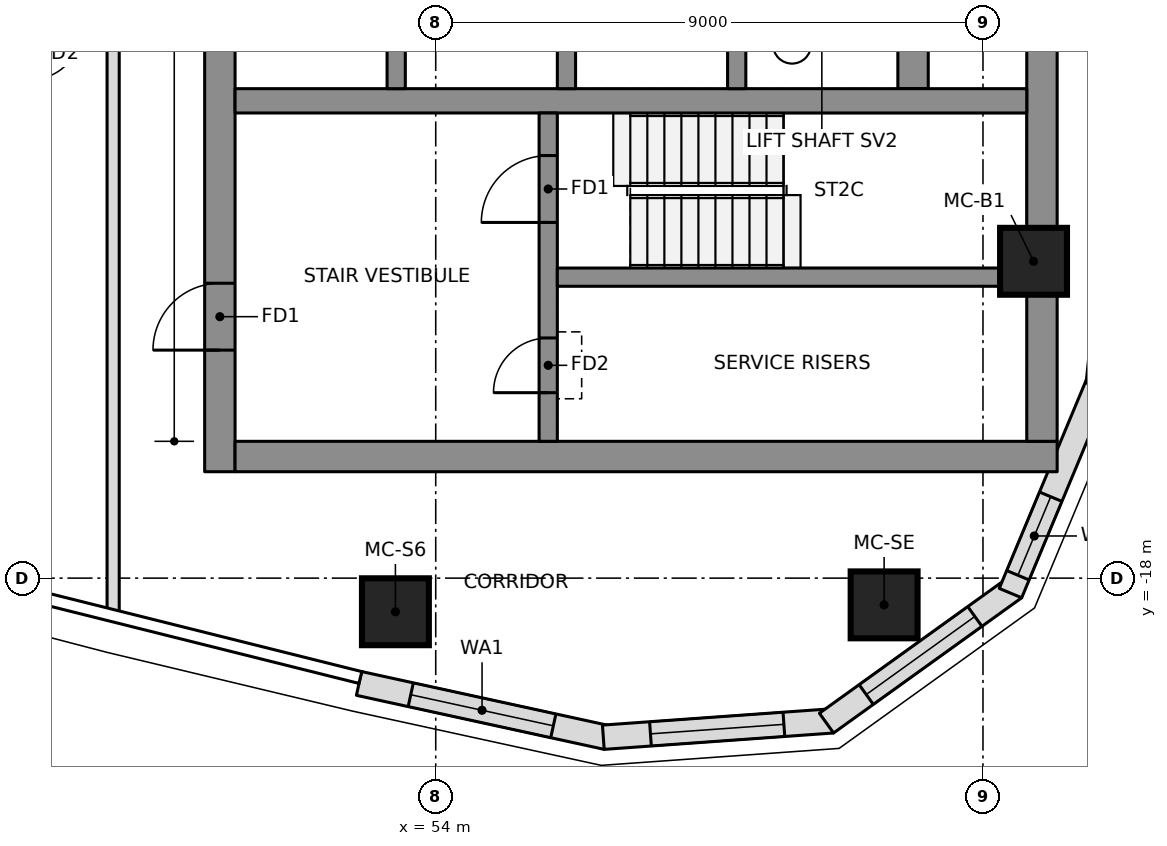
"""IFC4 building model, lengths in metres.
Left out: names, types, materials, properties, quantities, classifications, styles, units other than length and angle.
Written with IfcOpenShell. Run it as: python <this file> out.ifc"""

import sys

from ifc_helpers import new_model, si_unit, direction, frame, frame_2d, origin, origin_2d, place, context, subcontext, project, spatial, polyline, rectangle, outline, extrude, element, fill, save


model = new_model("IFC4")
c1 = context("Model", 3, precision=1e-05, world=origin(), true_north=direction((0.0, 1.0)))
c2 = subcontext(c1, "Body", "Model", "MODEL_VIEW")
j1 = project(units=[si_unit("LENGTHUNIT", "METRE"), si_unit("PLANEANGLEUNIT", "RADIAN")], contexts=[c1])
p1 = place(None, origin())
s1 = spatial("IfcSite", under=j1, at=p1, CompositionType="ELEMENT")
p2 = place(p1, origin())
s2 = spatial("IfcBuilding", under=s1, at=p2, CompositionType="ELEMENT")
p3 = place(p2, frame((0.0, 0.0, 292.75)))
s3 = spatial("IfcBuildingStorey", under=s2, at=p3, CompositionType="ELEMENT", Elevation=292.75)
p4 = place(p3, frame((50.45, -16.25, 0.0), z_axis=(0.0, 0.0, 1.0), x_axis=(0.0, 1.0, 0.0)))
e1 = element("IfcWall", 1, at=p4, inside=s3, PredefinedType="SHEAR", context=c2, shape_type="SweptSolid", body=[
    extrude(rectangle(XDim=9.6, YDim=0.5, at=frame_2d((4.8, 0.0))), origin(), (0.0, 0.0, 1.0), 3.55),
])
p5 = place(p4, frame((2.0, 0.0, 0.0)))
e2 = element("IfcOpeningElement", 2, at=p5, cuts=e1, PredefinedType="OPENING", context=c2, shape_type="SweptSolid", body=[
    extrude(rectangle(XDim=1.1, YDim=2.1, at=frame_2d((0.55, 1.05))), frame((0.0, 0.26, 0.0), z_axis=(0.0, -1.0, 0.0), x_axis=(1.0, 0.0, 0.0)), (0.0, 0.0, 1.0), 0.52),
])
p6 = place(p3, frame((50.7, -16.0, 0.0), z_axis=(0.0, 0.0, 1.0), x_axis=(1.0, 0.0, 0.0)))
e3 = element("IfcWall", 3, at=p6, inside=s3, PredefinedType="SHEAR", context=c2, shape_type="SweptSolid", body=[
    extrude(rectangle(XDim=13.52, YDim=0.5, at=frame_2d((6.76, 0.0))), origin(), (0.0, 0.0, 1.0), 3.55),
])
p7 = place(p3, frame((63.97, -15.75, 0.0), z_axis=(0.0, 0.0, 1.0), x_axis=(0.0, 1.0, 0.0)))
e4 = element("IfcWall", 4, at=p7, inside=s3, PredefinedType="SHEAR", context=c2, shape_type="SweptSolid", body=[
    extrude(rectangle(XDim=8.847, YDim=0.5, at=frame_2d((4.423, 0.0))), origin(), (0.0, 0.0, 1.0), 3.55),
])
p8 = place(p3, frame((61.85, -9.95, 0.0), z_axis=(0.0, 0.0, 1.0), x_axis=(0.0, 1.0, 0.0)))
e5 = element("IfcWall", 5, at=p8, inside=s3, PredefinedType="SHEAR", context=c2, shape_type="SweptSolid", body=[
    extrude(rectangle(XDim=19.9, YDim=0.5, at=frame_2d((9.95, 0.0))), origin(), (0.0, 0.0, 1.0), 3.55),
])
p9 = place(p3, frame((50.7, -10.15, 0.0), z_axis=(0.0, 0.0, 1.0), x_axis=(1.0, 0.0, 0.0)))
e6 = element("IfcWall", 6, at=p9, inside=s3, PredefinedType="SHEAR", context=c2, shape_type="SweptSolid", body=[
    extrude(rectangle(XDim=13.02, YDim=0.4, at=frame_2d((6.51, 0.0))), origin(), (0.0, 0.0, 1.0), 3.55),
])
for number, where, z_axis, x_axis in (
    (7, (53.35, -9.95, 0.0), (0.0, 0.0, 1.0), (0.0, 1.0, 0.0)),
    (8, (56.15, -9.95, 0.0), (0.0, 0.0, 1.0), (0.0, 1.0, 0.0)),
    (9, (58.95, -9.95, 0.0), (0.0, 0.0, 1.0), (0.0, 1.0, 0.0)),
):
    element("IfcWall", number, at=place(p3, frame(where, z_axis=z_axis, x_axis=x_axis)), inside=s3, PredefinedType="SHEAR", context=c2, shape_type="SweptSolid", body=[
        extrude(rectangle(XDim=3.0, YDim=0.3, at=frame_2d((1.5, 0.0))), origin(), (0.0, 0.0, 1.0), 3.55),
    ])
p10 = place(p3, frame((55.85, -15.75, 0.0), z_axis=(0.0, 0.0, 1.0), x_axis=(0.0, 1.0, 0.0)))
e10 = element("IfcWall", 10, at=p10, inside=s3, PredefinedType="SHEAR", context=c2, shape_type="SweptSolid", body=[
    extrude(rectangle(XDim=5.4, YDim=0.3, at=frame_2d((2.7, 0.0))), origin(), (0.0, 0.0, 1.0), 3.55),
])
p11 = place(p10, frame((3.6, 0.0, 0.0)))
e11 = element("IfcOpeningElement", 11, at=p11, cuts=e10, PredefinedType="OPENING", context=c2, shape_type="SweptSolid", body=[
    extrude(rectangle(XDim=1.1, YDim=2.1, at=frame_2d((0.55, 1.05))), frame((0.0, 0.16, 0.0), z_axis=(0.0, -1.0, 0.0), x_axis=(1.0, 0.0, 0.0)), (0.0, 0.0, 1.0), 0.32),
])
p12 = place(p10, frame((0.8, 0.0, 0.0)))
e12 = element("IfcOpeningElement", 12, at=p12, cuts=e10, PredefinedType="OPENING", context=c2, shape_type="SweptSolid", body=[
    extrude(rectangle(XDim=0.9, YDim=2.1, at=frame_2d((0.45, 1.05))), frame((0.0, 0.16, 0.0), z_axis=(0.0, -1.0, 0.0), x_axis=(1.0, 0.0, 0.0)), (0.0, 0.0, 1.0), 0.32),
])
p13 = place(p3, frame((56.0, -13.05, 0.0), z_axis=(0.0, 0.0, 1.0), x_axis=(1.0, 0.0, 0.0)))
e13 = element("IfcWall", 13, at=p13, inside=s3, PredefinedType="SHEAR", context=c2, shape_type="SweptSolid", body=[
    extrude(rectangle(XDim=7.72, YDim=0.3, at=frame_2d((3.86, 0.0))), origin(), (0.0, 0.0, 1.0), 3.55),
])
for number, where, z_axis, x_axis in (
    (14, (53.337, -18.553, 0.0), (0.0, 0.0, 1.0), (1.0, 0.0, 0.0)),
    (15, (61.374, -18.44, 0.0), (0.0, 0.0, 1.0), (1.0, 0.0, 0.0)),
    (16, (63.832, -12.789, 0.0), (0.0, 0.0, 1.0), (1.0, 0.0, 0.0)),
):
    element("IfcColumn", number, at=place(p3, frame(where, z_axis=z_axis, x_axis=x_axis)), inside=s3, PredefinedType="COLUMN", context=c2, shape_type="SweptSolid", body=[
        extrude(rectangle(XDim=1.1, YDim=1.1, at=origin_2d()), origin(), (0.0, 0.0, 1.0), 3.55),
    ])
p14 = place(p3, frame((52.738, -19.732, 0.0), z_axis=(0.0, 0.0, 1.0), x_axis=(0.977020225348, -0.213146614471, 0.0)))
e17 = element("IfcWall", 17, at=p14, inside=s3, PredefinedType="NOTDEFINED", context=c2, shape_type="SweptSolid", body=[
    extrude(outline(polyline([(0.0, -0.2), (4.171, -0.2), (4.113, 0.2), (0.0, 0.2), (0.0, -0.2)])), origin(), (0.0, 0.0, 1.0), 3.25),
])
p15 = place(p14, frame((0.871, 0.0, 0.5)))
e18 = element("IfcOpeningElement", 18, at=p15, cuts=e17, PredefinedType="OPENING", context=c2, shape_type="SweptSolid", body=[
    extrude(rectangle(XDim=2.4, YDim=2.0, at=frame_2d((1.2, 1.0))), frame((0.0, 0.21, 0.0), z_axis=(0.0, -1.0, 0.0), x_axis=(1.0, 0.0, 0.0)), (0.0, 0.0, 1.0), 0.42),
])
p16 = place(p3, frame((56.785, -20.615, 0.0), z_axis=(0.0, 0.0, 1.0), x_axis=(0.99746272096, 0.071190731806, 0.0)))
e19 = element("IfcWall", 19, at=p16, inside=s3, PredefinedType="NOTDEFINED", context=c2, shape_type="SweptSolid", body=[
    extrude(outline(polyline([(-0.029, -0.2), (3.753, -0.2), (3.64, 0.2), (0.029, 0.2), (-0.029, -0.2)])), origin(), (0.0, 0.0, 1.0), 3.25),
])
p17 = place(p16, frame((0.748, 0.0, 0.6)))
e20 = element("IfcOpeningElement", 20, at=p17, cuts=e19, PredefinedType="OPENING", context=c2, shape_type="SweptSolid", body=[
    extrude(outline(polyline([(0.0, 1.35), (0.084, 1.771), (0.322, 2.128), (0.679, 2.366), (1.1, 2.45), (1.521, 2.366), (1.878, 2.128), (2.116, 1.771), (2.2, 1.35), (2.2, 1.1), (2.116, 0.679), (1.878, 0.322), (1.521, 0.084), (1.1, 0.0), (0.679, 0.084), (0.322, 0.322), (0.084, 0.679), (0.0, 1.1), (0.0, 1.35)])), frame((0.0, 0.21, 0.0), z_axis=(0.0, -1.0, 0.0), x_axis=(1.0, 0.0, 0.0)), (0.0, 0.0, 1.0), 0.42),
])
p18 = place(p3, frame((60.472, -20.352, 0.0), z_axis=(0.0, 0.0, 1.0), x_axis=(0.811962548682, 0.583709533533, 0.0)))
e21 = element("IfcWall", 21, at=p18, inside=s3, PredefinedType="NOTDEFINED", context=c2, shape_type="SweptSolid", body=[
    extrude(outline(polyline([(-0.057, -0.2), (3.753, -0.2), (3.64, 0.2), (0.057, 0.2), (-0.057, -0.2)])), origin(), (0.0, 0.0, 1.0), 3.25),
])
p19 = place(p18, frame((0.748, 0.0, 0.6)))
e22 = element("IfcOpeningElement", 22, at=p19, cuts=e21, PredefinedType="OPENING", context=c2, shape_type="SweptSolid", body=[
    extrude(outline(polyline([(0.0, 1.35), (0.084, 1.771), (0.322, 2.128), (0.679, 2.366), (1.1, 2.45), (1.521, 2.366), (1.878, 2.128), (2.116, 1.771), (2.2, 1.35), (2.2, 1.1), (2.116, 0.679), (1.878, 0.322), (1.521, 0.084), (1.1, 0.0), (0.679, 0.084), (0.322, 0.322), (0.084, 0.679), (0.0, 1.1), (0.0, 1.35)])), frame((0.0, 0.21, 0.0), z_axis=(0.0, -1.0, 0.0), x_axis=(1.0, 0.0, 0.0)), (0.0, 0.0, 1.0), 0.42),
])
p20 = place(p3, frame((63.474, -18.194, 0.0), z_axis=(0.0, 0.0, 1.0), x_axis=(0.385285857918, 0.922797273343, 0.0)))
e23 = element("IfcWall", 23, at=p20, inside=s3, PredefinedType="NOTDEFINED", context=c2, shape_type="SweptSolid", body=[
    extrude(outline(polyline([(-0.057, -0.2), (3.726, -0.2), (3.667, 0.2), (0.057, 0.2), (-0.057, -0.2)])), origin(), (0.0, 0.0, 1.0), 3.25),
])
p21 = place(p20, frame((0.261, 0.0, 0.6)))
e24 = element("IfcOpeningElement", 24, at=p21, cuts=e23, PredefinedType="OPENING", context=c2, shape_type="SweptSolid", body=[
    extrude(outline(polyline([(0.0, 1.75), (0.053, 2.018), (0.205, 2.245), (0.432, 2.397), (0.7, 2.45), (0.968, 2.397), (1.195, 2.245), (1.347, 2.018), (1.4, 1.75), (1.4, 0.7), (1.347, 0.432), (1.195, 0.205), (0.968, 0.053), (0.7, 0.0), (0.432, 0.053), (0.205, 0.205), (0.053, 0.432), (0.0, 0.7), (0.0, 1.75)])), frame((0.0, 0.21, 0.0), z_axis=(0.0, -1.0, 0.0), x_axis=(1.0, 0.0, 0.0)), (0.0, 0.0, 1.0), 0.42),
])
p22 = place(p3, frame((64.898, -14.782, 0.0), z_axis=(0.0, 0.0, 1.0), x_axis=(0.102249826987, 0.994758751096, 0.0)))
e25 = element("IfcWall", 25, at=p22, inside=s3, PredefinedType="NOTDEFINED", context=c2, shape_type="SweptSolid", body=[
    extrude(outline(polyline([(-0.03, -0.2), (4.237, -0.2), (4.23, 0.2), (0.03, 0.2), (-0.03, -0.2)])), origin(), (0.0, 0.0, 1.0), 3.25),
])
p23 = place(p22, frame((1.417, 0.0, 0.5)))
e26 = element("IfcOpeningElement", 26, at=p23, cuts=e25, PredefinedType="OPENING", context=c2, shape_type="SweptSolid", body=[
    extrude(rectangle(XDim=2.4, YDim=2.0, at=frame_2d((1.2, 1.0))), frame((0.0, 0.21, 0.0), z_axis=(0.0, -1.0, 0.0), x_axis=(1.0, 0.0, 0.0)), (0.0, 0.0, 1.0), 0.42),
])
p24 = place(p3, frame((48.695, -8.676, 0.0), z_axis=(0.0, 0.0, 1.0), x_axis=(0.0, -1.0, 0.0)))
e27 = element("IfcWall", 27, at=p24, inside=s3, PredefinedType="PARTITIONING", context=c2, shape_type="SweptSolid", body=[
    extrude(rectangle(XDim=9.877, YDim=0.2, at=frame_2d((4.938, 0.0))), origin(), (0.0, 0.0, 1.0), 3.25),
])
p25 = place(p15, origin())
e28 = element("IfcWindow", 28, at=p25, inside=s3, PartitioningType="SINGLE_PANEL", PredefinedType="WINDOW", context=c2, shape_type="SweptSolid", body=[
    extrude(rectangle(XDim=2.4, YDim=2.0, at=frame_2d((1.2, 1.0))), frame((0.0, 0.17, 0.0), z_axis=(0.0, -1.0, 0.0), x_axis=(1.0, 0.0, 0.0)), (0.0, 0.0, 1.0), 0.06),
])
fill(e18, e28)
p26 = place(p17, origin())
e29 = element("IfcWindow", 29, at=p26, inside=s3, PartitioningType="SINGLE_PANEL", PredefinedType="WINDOW", context=c2, shape_type="SweptSolid", body=[
    extrude(outline(polyline([(0.0, 1.35), (0.084, 1.771), (0.322, 2.128), (0.679, 2.366), (1.1, 2.45), (1.521, 2.366), (1.878, 2.128), (2.116, 1.771), (2.2, 1.35), (2.2, 1.1), (2.116, 0.679), (1.878, 0.322), (1.521, 0.084), (1.1, 0.0), (0.679, 0.084), (0.322, 0.322), (0.084, 0.679), (0.0, 1.1), (0.0, 1.35)])), frame((0.0, 0.17, 0.0), z_axis=(0.0, -1.0, 0.0), x_axis=(1.0, 0.0, 0.0)), (0.0, 0.0, 1.0), 0.06),
])
fill(e20, e29)
p27 = place(p19, origin())
e30 = element("IfcWindow", 30, at=p27, inside=s3, PartitioningType="SINGLE_PANEL", PredefinedType="WINDOW", context=c2, shape_type="SweptSolid", body=[
    extrude(outline(polyline([(0.0, 1.35), (0.084, 1.771), (0.322, 2.128), (0.679, 2.366), (1.1, 2.45), (1.521, 2.366), (1.878, 2.128), (2.116, 1.771), (2.2, 1.35), (2.2, 1.1), (2.116, 0.679), (1.878, 0.322), (1.521, 0.084), (1.1, 0.0), (0.679, 0.084), (0.322, 0.322), (0.084, 0.679), (0.0, 1.1), (0.0, 1.35)])), frame((0.0, 0.17, 0.0), z_axis=(0.0, -1.0, 0.0), x_axis=(1.0, 0.0, 0.0)), (0.0, 0.0, 1.0), 0.06),
])
fill(e22, e30)
p28 = place(p21, origin())
e31 = element("IfcWindow", 31, at=p28, inside=s3, PartitioningType="SINGLE_PANEL", PredefinedType="WINDOW", context=c2, shape_type="SweptSolid", body=[
    extrude(outline(polyline([(0.0, 1.75), (0.053, 2.018), (0.205, 2.245), (0.432, 2.397), (0.7, 2.45), (0.968, 2.397), (1.195, 2.245), (1.347, 2.018), (1.4, 1.75), (1.4, 0.7), (1.347, 0.432), (1.195, 0.205), (0.968, 0.053), (0.7, 0.0), (0.432, 0.053), (0.205, 0.205), (0.053, 0.432), (0.0, 0.7), (0.0, 1.75)])), frame((0.0, 0.17, 0.0), z_axis=(0.0, -1.0, 0.0), x_axis=(1.0, 0.0, 0.0)), (0.0, 0.0, 1.0), 0.06),
])
fill(e24, e31)
p29 = place(p11, origin())
e32 = element("IfcDoor", 32, at=p29, inside=s3, OperationType="SINGLE_SWING_RIGHT", PredefinedType="DOOR", context=c2, shape_type="SweptSolid", body=[
    extrude(rectangle(XDim=1.1, YDim=2.1, at=frame_2d((0.55, 1.05))), frame((0.0, 0.025, 0.0), z_axis=(0.0, -1.0, 0.0), x_axis=(1.0, 0.0, 0.0)), (0.0, 0.0, 1.0), 0.05),
])
fill(e11, e32)
p30 = place(p5, origin())
e33 = element("IfcDoor", 33, at=p30, inside=s3, OperationType="SINGLE_SWING_RIGHT", PredefinedType="DOOR", context=c2, shape_type="SweptSolid", body=[
    extrude(rectangle(XDim=1.1, YDim=2.1, at=frame_2d((0.55, 1.05))), frame((0.0, 0.025, 0.0), z_axis=(0.0, -1.0, 0.0), x_axis=(1.0, 0.0, 0.0)), (0.0, 0.0, 1.0), 0.05),
])
fill(e2, e33)
p31 = place(p12, origin())
e34 = element("IfcDoor", 34, at=p31, inside=s3, OperationType="SINGLE_SWING_LEFT", PredefinedType="DOOR", context=c2, shape_type="SweptSolid", body=[
    extrude(rectangle(XDim=0.9, YDim=2.1, at=frame_2d((0.45, 1.05))), frame((0.0, 0.025, 0.0), z_axis=(0.0, -1.0, 0.0), x_axis=(1.0, 0.0, 0.0)), (0.0, 0.0, 1.0), 0.05),
])
fill(e12, e34)
save(model, sys.argv[1])
